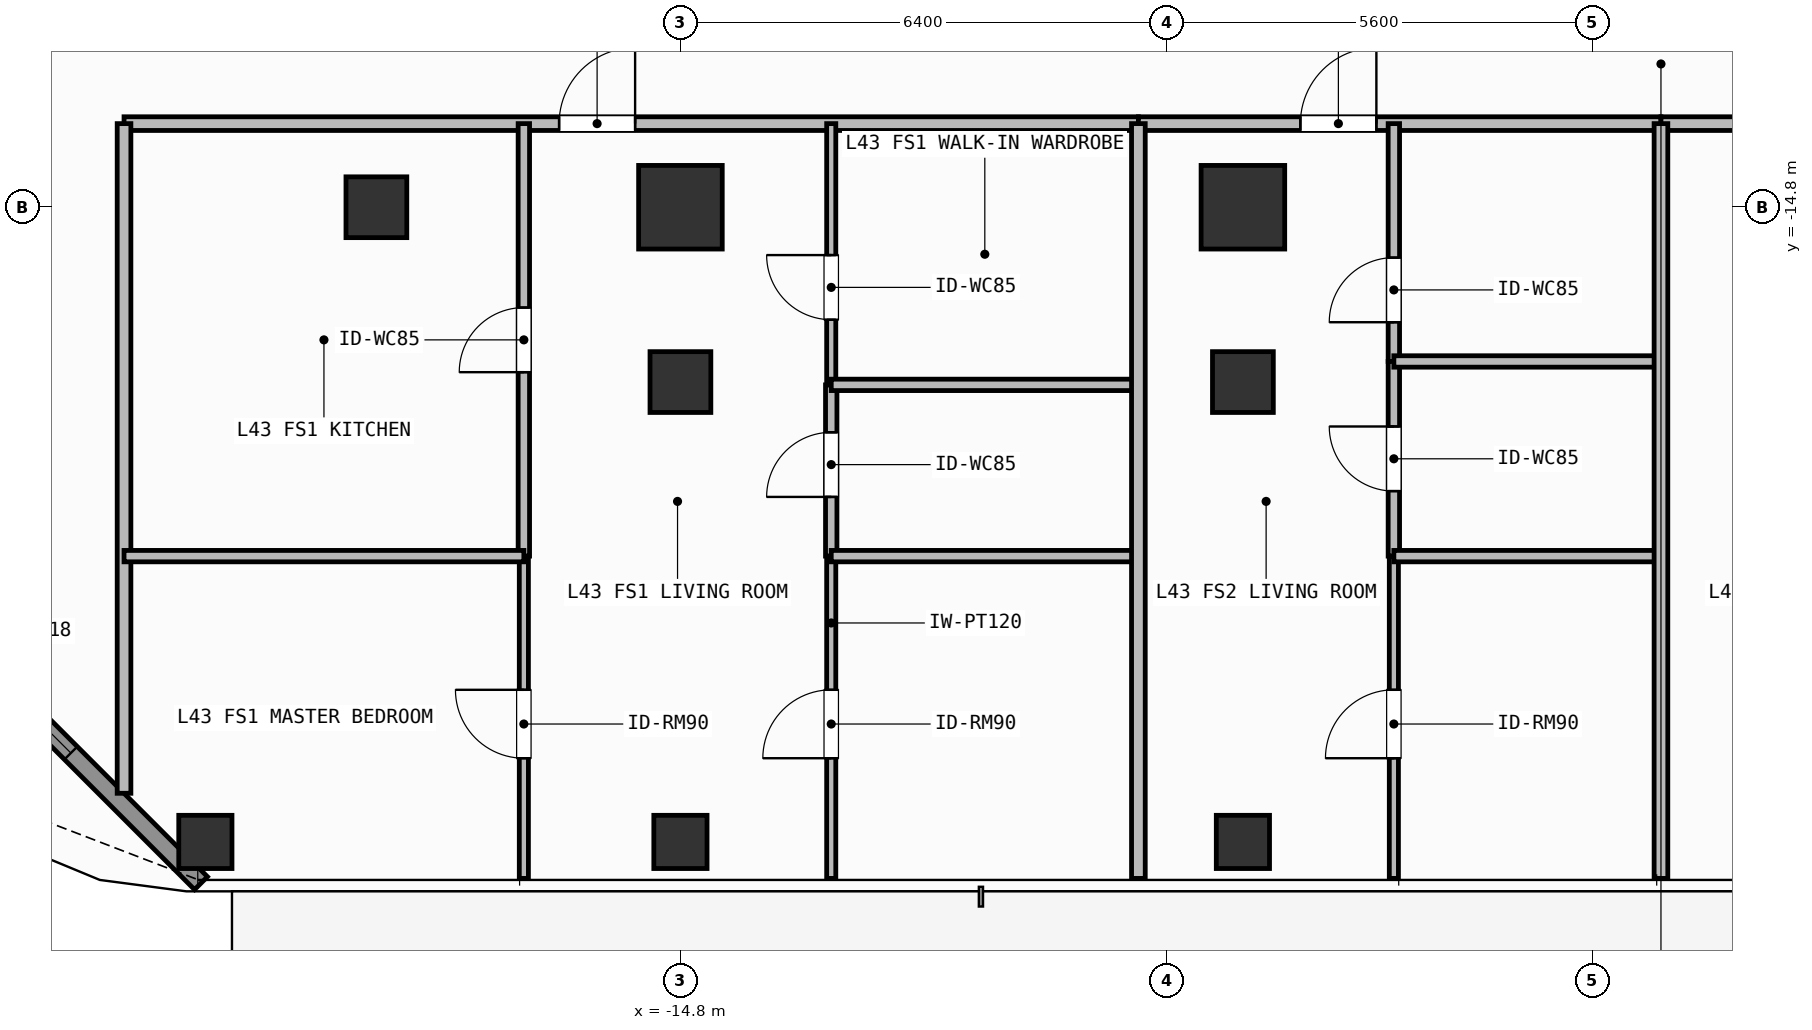
"""IFC4 building model, lengths in metres.
Left out: names, types, materials, properties, quantities, classifications, styles, units other than length and angle.
Written with IfcOpenShell. Run it as: python <this file> out.ifc"""

import sys

from ifc_helpers import new_model, si_unit, direction, frame, frame_2d, origin, origin_2d, place, context, subcontext, project, spatial, rectangle, hollow_rectangle, extrude, element, fill, save


model = new_model("IFC4")
c1 = context("Model", 3, precision=1e-05, world=origin(), true_north=direction((0.0, 1.0)))
c2 = subcontext(c1, "Body", "Model", "MODEL_VIEW")
j1 = project(units=[si_unit("LENGTHUNIT", "METRE"), si_unit("PLANEANGLEUNIT", "RADIAN")], contexts=[c1])
p1 = place(None, origin())
s1 = spatial("IfcSite", under=j1, at=p1, CompositionType="ELEMENT")
p2 = place(p1, origin())
s2 = spatial("IfcBuilding", under=s1, at=p2, CompositionType="ELEMENT")
p3 = place(p2, frame((0.0, 0.0, 175.8)))
s3 = spatial("IfcBuildingStorey", under=s2, at=p3, CompositionType="ELEMENT", Elevation=175.8)
for number, where, z_axis, x_axis in (
    (1, (-14.8, -14.8, 0.0), (0.0, 0.0, 1.0), (1.0, 0.0, 0.0)),
    (2, (-7.4, -14.8, 0.0), (0.0, 0.0, 1.0), (1.0, 0.0, 0.0)),
):
    element("IfcColumn", number, at=place(p3, frame(where, z_axis=z_axis, x_axis=x_axis)), inside=s3, PredefinedType="COLUMN", context=c2, shape_type="SweptSolid", body=[
        extrude(rectangle(XDim=1.1, YDim=1.1, at=origin_2d()), origin(), (0.0, 0.0, 1.0), 3.9),
    ])
for number, where, z_axis, x_axis in (
    (3, (-18.8, -14.8, 0.0), (0.0, 0.0, 1.0), (1.0, 0.0, 0.0)),
    (4, (-14.8, -17.1, 0.0), (0.0, 0.0, 1.0), (1.0, 0.0, 0.0)),
    (5, (-7.4, -17.1, 0.0), (0.0, 0.0, 1.0), (1.0, 0.0, 0.0)),
):
    element("IfcColumn", number, at=place(p3, frame(where, z_axis=z_axis, x_axis=x_axis)), inside=s3, PredefinedType="COLUMN", context=c2, shape_type="SweptSolid", body=[
        extrude(hollow_rectangle(XDim=0.8, YDim=0.8, WallThickness=0.036, at=origin_2d()), origin(), (0.0, 0.0, 1.0), 3.9),
    ])
for number, where, z_axis, x_axis in (
    (6, (-21.05, -23.15, 0.0), (0.0, 0.0, 1.0), (1.0, 0.0, 0.0)),
    (7, (-14.8, -23.15, 0.0), (0.0, 0.0, 1.0), (1.0, 0.0, 0.0)),
    (8, (-7.4, -23.15, 0.0), (0.0, 0.0, 1.0), (1.0, 0.0, 0.0)),
):
    element("IfcColumn", number, at=place(p3, frame(where, z_axis=z_axis, x_axis=x_axis)), inside=s3, PredefinedType="COLUMN", context=c2, shape_type="SweptSolid", body=[
        extrude(hollow_rectangle(XDim=0.7, YDim=0.7, WallThickness=0.032, at=origin_2d()), origin(), (0.0, 0.0, 1.0), 3.9),
    ])
p4 = place(p3, frame((-21.108, -23.692, 0.0), z_axis=(0.0, 0.0, 1.0), x_axis=(-0.707087534163, 0.707126027686, 0.0)))
e9 = element("IfcWall", 9, at=p4, inside=s3, PredefinedType="SOLIDWALL", context=c2, shape_type="SweptSolid", body=[
    extrude(rectangle(XDim=6.342, YDim=0.24, at=frame_2d((3.171, 0.0))), origin(), (0.0, 0.0, 1.0), 3.68),
])
p5 = place(p4, frame((2.421, 0.0, 0.8)))
e10 = element("IfcOpeningElement", 10, at=p5, cuts=e9, PredefinedType="OPENING", context=c2, shape_type="SweptSolid", body=[
    extrude(rectangle(XDim=1.5, YDim=1.85, at=frame_2d((0.75, 0.925))), frame((0.0, 0.13, 0.0), z_axis=(0.0, -1.0, 0.0), x_axis=(1.0, 0.0, 0.0)), (0.0, 0.0, 1.0), 0.26),
])
p6 = place(p3, frame((-22.12, -13.7, 0.0), z_axis=(0.0, 0.0, 1.0), x_axis=(1.0, 0.0, 0.0)))
e11 = element("IfcWall", 11, at=p6, inside=s3, PredefinedType="PARTITIONING", context=c2, shape_type="SweptSolid", body=[
    extrude(rectangle(XDim=13.345, YDim=0.18, at=frame_2d((6.673, 0.0))), origin(), (0.0, 0.0, 1.0), 3.68),
])
p7 = place(p6, frame((5.724, 0.0, 0.0)))
e12 = element("IfcOpeningElement", 12, at=p7, cuts=e11, PredefinedType="OPENING", context=c2, shape_type="SweptSolid", body=[
    extrude(rectangle(XDim=1.0, YDim=2.2, at=frame_2d((0.5, 1.1))), frame((0.0, 0.1, 0.0), z_axis=(0.0, -1.0, 0.0), x_axis=(1.0, 0.0, 0.0)), (0.0, 0.0, 1.0), 0.2),
])
p8 = place(p3, frame((-16.86, -19.39, 0.0), z_axis=(0.0, 0.0, 1.0), x_axis=(0.0, 1.0, 0.0)))
e13 = element("IfcWall", 13, at=p8, inside=s3, PredefinedType="PARTITIONING", context=c2, shape_type="SweptSolid", body=[
    extrude(rectangle(XDim=5.69, YDim=0.15, at=frame_2d((2.845, 0.0))), origin(), (0.0, 0.0, 1.0), 3.68),
])
p9 = place(p8, frame((2.42, 0.0, 0.0)))
e14 = element("IfcOpeningElement", 14, at=p9, cuts=e13, PredefinedType="OPENING", context=c2, shape_type="SweptSolid", body=[
    extrude(rectangle(XDim=0.85, YDim=2.1, at=frame_2d((0.425, 1.05))), frame((0.0, 0.085, 0.0), z_axis=(0.0, -1.0, 0.0), x_axis=(1.0, 0.0, 0.0)), (0.0, 0.0, 1.0), 0.17),
])
p10 = place(p3, frame((-16.86, -23.63, 0.0), z_axis=(0.0, 0.0, 1.0), x_axis=(0.0, 1.0, 0.0)))
e15 = element("IfcWall", 15, at=p10, inside=s3, PredefinedType="PARTITIONING", context=c2, shape_type="SweptSolid", body=[
    extrude(rectangle(XDim=4.24, YDim=0.12, at=frame_2d((2.12, 0.0))), origin(), (0.0, 0.0, 1.0), 3.68),
])
p11 = place(p10, frame((1.581, 0.0, 0.0)))
e16 = element("IfcOpeningElement", 16, at=p11, cuts=e15, PredefinedType="OPENING", context=c2, shape_type="SweptSolid", body=[
    extrude(rectangle(XDim=0.9, YDim=2.1, at=frame_2d((0.45, 1.05))), frame((0.0, 0.07, 0.0), z_axis=(0.0, -1.0, 0.0), x_axis=(1.0, 0.0, 0.0)), (0.0, 0.0, 1.0), 0.14),
])
p12 = place(p3, frame((-12.816, -19.39, 0.0), z_axis=(0.0, 0.0, 1.0), x_axis=(0.0, 1.0, 0.0)))
e17 = element("IfcWall", 17, at=p12, inside=s3, PredefinedType="PARTITIONING", context=c2, shape_type="SweptSolid", body=[
    extrude(rectangle(XDim=2.253, YDim=0.15, at=frame_2d((1.126, 0.0))), origin(), (0.0, 0.0, 1.0), 3.68),
])
p13 = place(p12, frame((0.779, 0.0, 0.0)))
e18 = element("IfcOpeningElement", 18, at=p13, cuts=e17, PredefinedType="OPENING", context=c2, shape_type="SweptSolid", body=[
    extrude(rectangle(XDim=0.85, YDim=2.1, at=frame_2d((0.425, 1.05))), frame((0.0, 0.085, 0.0), z_axis=(0.0, -1.0, 0.0), x_axis=(1.0, 0.0, 0.0)), (0.0, 0.0, 1.0), 0.17),
])
p14 = place(p3, frame((-12.816, -17.137, 0.0), z_axis=(0.0, 0.0, 1.0), x_axis=(0.0, 1.0, 0.0)))
e19 = element("IfcWall", 19, at=p14, inside=s3, PredefinedType="PARTITIONING", context=c2, shape_type="SweptSolid", body=[
    extrude(rectangle(XDim=3.437, YDim=0.12, at=frame_2d((1.719, 0.0))), origin(), (0.0, 0.0, 1.0), 3.68),
])
p15 = place(p14, frame((0.857, 0.0, 0.0)))
e20 = element("IfcOpeningElement", 20, at=p15, cuts=e19, PredefinedType="OPENING", context=c2, shape_type="SweptSolid", body=[
    extrude(rectangle(XDim=0.85, YDim=2.1, at=frame_2d((0.425, 1.05))), frame((0.0, 0.07, 0.0), z_axis=(0.0, -1.0, 0.0), x_axis=(1.0, 0.0, 0.0)), (0.0, 0.0, 1.0), 0.14),
])
p16 = place(p3, frame((-12.816, -23.63, 0.0), z_axis=(0.0, 0.0, 1.0), x_axis=(0.0, 1.0, 0.0)))
e21 = element("IfcWall", 21, at=p16, inside=s3, PredefinedType="PARTITIONING", context=c2, shape_type="SweptSolid", body=[
    extrude(rectangle(XDim=4.24, YDim=0.12, at=frame_2d((2.12, 0.0))), origin(), (0.0, 0.0, 1.0), 3.68),
])
p17 = place(p16, frame((1.581, 0.0, 0.0)))
e22 = element("IfcOpeningElement", 22, at=p17, cuts=e21, PredefinedType="OPENING", context=c2, shape_type="SweptSolid", body=[
    extrude(rectangle(XDim=0.9, YDim=2.1, at=frame_2d((0.45, 1.05))), frame((0.0, 0.07, 0.0), z_axis=(0.0, -1.0, 0.0), x_axis=(1.0, 0.0, 0.0)), (0.0, 0.0, 1.0), 0.14),
])
p18 = place(p3, frame((-8.775, -13.7, 0.0), z_axis=(0.0, 0.0, 1.0), x_axis=(1.0, 0.0, 0.0)))
e23 = element("IfcWall", 23, at=p18, inside=s3, PredefinedType="PARTITIONING", context=c2, shape_type="SweptSolid", body=[
    extrude(rectangle(XDim=6.875, YDim=0.18, at=frame_2d((3.438, 0.0))), origin(), (0.0, 0.0, 1.0), 3.68),
])
p19 = place(p18, frame((2.131, 0.0, 0.0)))
e24 = element("IfcOpeningElement", 24, at=p19, cuts=e23, PredefinedType="OPENING", context=c2, shape_type="SweptSolid", body=[
    extrude(rectangle(XDim=1.0, YDim=2.2, at=frame_2d((0.5, 1.1))), frame((0.0, 0.1, 0.0), z_axis=(0.0, -1.0, 0.0), x_axis=(1.0, 0.0, 0.0)), (0.0, 0.0, 1.0), 0.2),
])
p20 = place(p3, frame((-5.414, -16.829, 0.0), z_axis=(0.0, 0.0, 1.0), x_axis=(0.0, 1.0, 0.0)))
e25 = element("IfcWall", 25, at=p20, inside=s3, PredefinedType="PARTITIONING", context=c2, shape_type="SweptSolid", body=[
    extrude(rectangle(XDim=3.129, YDim=0.15, at=frame_2d((1.564, 0.0))), origin(), (0.0, 0.0, 1.0), 3.68),
])
p21 = place(p20, frame((0.516, 0.0, 0.0)))
e26 = element("IfcOpeningElement", 26, at=p21, cuts=e25, PredefinedType="OPENING", context=c2, shape_type="SweptSolid", body=[
    extrude(rectangle(XDim=0.85, YDim=2.1, at=frame_2d((0.425, 1.05))), frame((0.0, 0.085, 0.0), z_axis=(0.0, -1.0, 0.0), x_axis=(1.0, 0.0, 0.0)), (0.0, 0.0, 1.0), 0.17),
])
p22 = place(p3, frame((-5.414, -19.39, 0.0), z_axis=(0.0, 0.0, 1.0), x_axis=(0.0, 1.0, 0.0)))
e27 = element("IfcWall", 27, at=p22, inside=s3, PredefinedType="PARTITIONING", context=c2, shape_type="SweptSolid", body=[
    extrude(rectangle(XDim=2.561, YDim=0.15, at=frame_2d((1.28, 0.0))), origin(), (0.0, 0.0, 1.0), 3.68),
])
p23 = place(p22, frame((0.855, 0.0, 0.0)))
e28 = element("IfcOpeningElement", 28, at=p23, cuts=e27, PredefinedType="OPENING", context=c2, shape_type="SweptSolid", body=[
    extrude(rectangle(XDim=0.85, YDim=2.1, at=frame_2d((0.425, 1.05))), frame((0.0, 0.085, 0.0), z_axis=(0.0, -1.0, 0.0), x_axis=(1.0, 0.0, 0.0)), (0.0, 0.0, 1.0), 0.17),
])
p24 = place(p3, frame((-5.414, -23.63, 0.0), z_axis=(0.0, 0.0, 1.0), x_axis=(0.0, 1.0, 0.0)))
e29 = element("IfcWall", 29, at=p24, inside=s3, PredefinedType="PARTITIONING", context=c2, shape_type="SweptSolid", body=[
    extrude(rectangle(XDim=4.24, YDim=0.12, at=frame_2d((2.12, 0.0))), origin(), (0.0, 0.0, 1.0), 3.68),
])
p25 = place(p24, frame((1.581, 0.0, 0.0)))
e30 = element("IfcOpeningElement", 30, at=p25, cuts=e29, PredefinedType="OPENING", context=c2, shape_type="SweptSolid", body=[
    extrude(rectangle(XDim=0.9, YDim=2.1, at=frame_2d((0.45, 1.05))), frame((0.0, 0.07, 0.0), z_axis=(0.0, -1.0, 0.0), x_axis=(1.0, 0.0, 0.0)), (0.0, 0.0, 1.0), 0.14),
])
p26 = place(p3, frame((-1.9, -13.7, 0.0), z_axis=(0.0, 0.0, 1.0), x_axis=(1.0, 0.0, 0.0)))
e31 = element("IfcWall", 31, at=p26, inside=s3, PredefinedType="PARTITIONING", context=c2, shape_type="SweptSolid", body=[
    extrude(rectangle(XDim=8.654, YDim=0.18, at=frame_2d((4.327, 0.0))), origin(), (0.0, 0.0, 1.0), 3.68),
])
p27 = place(p26, frame((2.664, 0.0, 0.0)))
e32 = element("IfcOpeningElement", 32, at=p27, cuts=e31, PredefinedType="OPENING", context=c2, shape_type="SweptSolid", body=[
    extrude(rectangle(XDim=1.0, YDim=2.2, at=frame_2d((0.5, 1.1))), frame((0.0, 0.1, 0.0), z_axis=(0.0, -1.0, 0.0), x_axis=(1.0, 0.0, 0.0)), (0.0, 0.0, 1.0), 0.2),
])
p28 = place(p3, frame((-22.12, -22.51, 0.0), z_axis=(0.0, 0.0, 1.0), x_axis=(0.0, 1.0, 0.0)))
e33 = element("IfcWall", 33, at=p28, inside=s3, PredefinedType="PARTITIONING", context=c2, shape_type="SweptSolid", body=[
    extrude(rectangle(XDim=8.81, YDim=0.18, at=frame_2d((4.405, 0.0))), origin(), (0.0, 0.0, 1.0), 3.68),
])
p29 = place(p3, frame((-22.12, -19.39, 0.0), z_axis=(0.0, 0.0, 1.0), x_axis=(1.0, 0.0, 0.0)))
e34 = element("IfcWall", 34, at=p29, inside=s3, PredefinedType="PARTITIONING", context=c2, shape_type="SweptSolid", body=[
    extrude(rectangle(XDim=5.26, YDim=0.15, at=frame_2d((2.63, 0.0))), origin(), (0.0, 0.0, 1.0), 3.68),
])
p30 = place(p3, frame((-12.816, -17.137, 0.0), z_axis=(0.0, 0.0, 1.0), x_axis=(1.0, 0.0, 0.0)))
e35 = element("IfcWall", 35, at=p30, inside=s3, PredefinedType="PARTITIONING", context=c2, shape_type="SweptSolid", body=[
    extrude(rectangle(XDim=4.041, YDim=0.15, at=frame_2d((2.021, 0.0))), origin(), (0.0, 0.0, 1.0), 3.082),
])
p31 = place(p3, frame((-12.816, -19.39, 0.0), z_axis=(0.0, 0.0, 1.0), x_axis=(1.0, 0.0, 0.0)))
e36 = element("IfcWall", 36, at=p31, inside=s3, PredefinedType="PARTITIONING", context=c2, shape_type="SweptSolid", body=[
    extrude(rectangle(XDim=4.041, YDim=0.15, at=frame_2d((2.021, 0.0))), origin(), (0.0, 0.0, 1.0), 3.68),
])
p32 = place(p3, frame((-5.414, -16.829, 0.0), z_axis=(0.0, 0.0, 1.0), x_axis=(1.0, 0.0, 0.0)))
e37 = element("IfcWall", 37, at=p32, inside=s3, PredefinedType="PARTITIONING", context=c2, shape_type="SweptSolid", body=[
    extrude(rectangle(XDim=3.514, YDim=0.15, at=frame_2d((1.757, 0.0))), origin(), (0.0, 0.0, 1.0), 3.082),
])
p33 = place(p3, frame((-5.414, -19.39, 0.0), z_axis=(0.0, 0.0, 1.0), x_axis=(1.0, 0.0, 0.0)))
e38 = element("IfcWall", 38, at=p33, inside=s3, PredefinedType="PARTITIONING", context=c2, shape_type="SweptSolid", body=[
    extrude(rectangle(XDim=3.514, YDim=0.15, at=frame_2d((1.757, 0.0))), origin(), (0.0, 0.0, 1.0), 3.68),
])
for number, where, z_axis, x_axis in (
    (39, (-8.775, -23.63, 0.0), (0.0, 0.0, 1.0), (0.0, 1.0, 0.0)),
    (40, (-1.9, -23.63, 0.0), (0.0, 0.0, 1.0), (0.0, 1.0, 0.0)),
):
    element("IfcWall", number, at=place(p3, frame(where, z_axis=z_axis, x_axis=x_axis)), inside=s3, PredefinedType="PARTITIONING", context=c2, shape_type="SweptSolid", body=[
        extrude(rectangle(XDim=9.93, YDim=0.18, at=frame_2d((4.965, 0.0))), origin(), (0.0, 0.0, 1.0), 3.68),
    ])
p34 = place(p5, origin())
e41 = element("IfcWindow", 41, at=p34, inside=s3, PartitioningType="SINGLE_PANEL", PredefinedType="WINDOW", context=c2, shape_type="SweptSolid", body=[
    extrude(rectangle(XDim=1.5, YDim=1.85, at=frame_2d((0.75, 0.925))), frame((0.0, 0.03, 0.0), z_axis=(0.0, -1.0, 0.0), x_axis=(1.0, 0.0, 0.0)), (0.0, 0.0, 1.0), 0.06),
])
fill(e10, e41)
p35 = place(p7, origin())
e42 = element("IfcDoor", 42, at=p35, inside=s3, OperationType="SINGLE_SWING_RIGHT", PredefinedType="DOOR", context=c2, shape_type="SweptSolid", body=[
    extrude(rectangle(XDim=1.0, YDim=2.2, at=frame_2d((0.5, 1.1))), frame((0.0, 0.025, 0.0), z_axis=(0.0, -1.0, 0.0), x_axis=(1.0, 0.0, 0.0)), (0.0, 0.0, 1.0), 0.05),
])
fill(e12, e42)
p36 = place(p9, origin())
e43 = element("IfcDoor", 43, at=p36, inside=s3, OperationType="SINGLE_SWING_LEFT", PredefinedType="DOOR", context=c2, shape_type="SweptSolid", body=[
    extrude(rectangle(XDim=0.85, YDim=2.1, at=frame_2d((0.425, 1.05))), frame((0.0, 0.025, 0.0), z_axis=(0.0, -1.0, 0.0), x_axis=(1.0, 0.0, 0.0)), (0.0, 0.0, 1.0), 0.05),
])
fill(e14, e43)
p37 = place(p11, origin())
e44 = element("IfcDoor", 44, at=p37, inside=s3, OperationType="SINGLE_SWING_RIGHT", PredefinedType="DOOR", context=c2, shape_type="SweptSolid", body=[
    extrude(rectangle(XDim=0.9, YDim=2.1, at=frame_2d((0.45, 1.05))), frame((0.0, 0.025, 0.0), z_axis=(0.0, -1.0, 0.0), x_axis=(1.0, 0.0, 0.0)), (0.0, 0.0, 1.0), 0.05),
])
fill(e16, e44)
p38 = place(p13, origin())
e45 = element("IfcDoor", 45, at=p38, inside=s3, OperationType="SINGLE_SWING_LEFT", PredefinedType="DOOR", context=c2, shape_type="SweptSolid", body=[
    extrude(rectangle(XDim=0.85, YDim=2.1, at=frame_2d((0.425, 1.05))), frame((0.0, 0.025, 0.0), z_axis=(0.0, -1.0, 0.0), x_axis=(1.0, 0.0, 0.0)), (0.0, 0.0, 1.0), 0.05),
])
fill(e18, e45)
p39 = place(p15, origin())
e46 = element("IfcDoor", 46, at=p39, inside=s3, OperationType="SINGLE_SWING_RIGHT", PredefinedType="DOOR", context=c2, shape_type="SweptSolid", body=[
    extrude(rectangle(XDim=0.85, YDim=2.1, at=frame_2d((0.425, 1.05))), frame((0.0, 0.025, 0.0), z_axis=(0.0, -1.0, 0.0), x_axis=(1.0, 0.0, 0.0)), (0.0, 0.0, 1.0), 0.05),
])
fill(e20, e46)
p40 = place(p17, origin())
e47 = element("IfcDoor", 47, at=p40, inside=s3, OperationType="SINGLE_SWING_LEFT", PredefinedType="DOOR", context=c2, shape_type="SweptSolid", body=[
    extrude(rectangle(XDim=0.9, YDim=2.1, at=frame_2d((0.45, 1.05))), frame((0.0, 0.025, 0.0), z_axis=(0.0, -1.0, 0.0), x_axis=(1.0, 0.0, 0.0)), (0.0, 0.0, 1.0), 0.05),
])
fill(e22, e47)
p41 = place(p19, origin())
e48 = element("IfcDoor", 48, at=p41, inside=s3, OperationType="SINGLE_SWING_RIGHT", PredefinedType="DOOR", context=c2, shape_type="SweptSolid", body=[
    extrude(rectangle(XDim=1.0, YDim=2.2, at=frame_2d((0.5, 1.1))), frame((0.0, 0.025, 0.0), z_axis=(0.0, -1.0, 0.0), x_axis=(1.0, 0.0, 0.0)), (0.0, 0.0, 1.0), 0.05),
])
fill(e24, e48)
p42 = place(p21, origin())
e49 = element("IfcDoor", 49, at=p42, inside=s3, OperationType="SINGLE_SWING_LEFT", PredefinedType="DOOR", context=c2, shape_type="SweptSolid", body=[
    extrude(rectangle(XDim=0.85, YDim=2.1, at=frame_2d((0.425, 1.05))), frame((0.0, 0.025, 0.0), z_axis=(0.0, -1.0, 0.0), x_axis=(1.0, 0.0, 0.0)), (0.0, 0.0, 1.0), 0.05),
])
fill(e26, e49)
p43 = place(p23, origin())
e50 = element("IfcDoor", 50, at=p43, inside=s3, OperationType="SINGLE_SWING_RIGHT", PredefinedType="DOOR", context=c2, shape_type="SweptSolid", body=[
    extrude(rectangle(XDim=0.85, YDim=2.1, at=frame_2d((0.425, 1.05))), frame((0.0, 0.025, 0.0), z_axis=(0.0, -1.0, 0.0), x_axis=(1.0, 0.0, 0.0)), (0.0, 0.0, 1.0), 0.05),
])
fill(e28, e50)
p44 = place(p25, origin())
e51 = element("IfcDoor", 51, at=p44, inside=s3, OperationType="SINGLE_SWING_LEFT", PredefinedType="DOOR", context=c2, shape_type="SweptSolid", body=[
    extrude(rectangle(XDim=0.9, YDim=2.1, at=frame_2d((0.45, 1.05))), frame((0.0, 0.025, 0.0), z_axis=(0.0, -1.0, 0.0), x_axis=(1.0, 0.0, 0.0)), (0.0, 0.0, 1.0), 0.05),
])
fill(e30, e51)
save(model, sys.argv[1])
